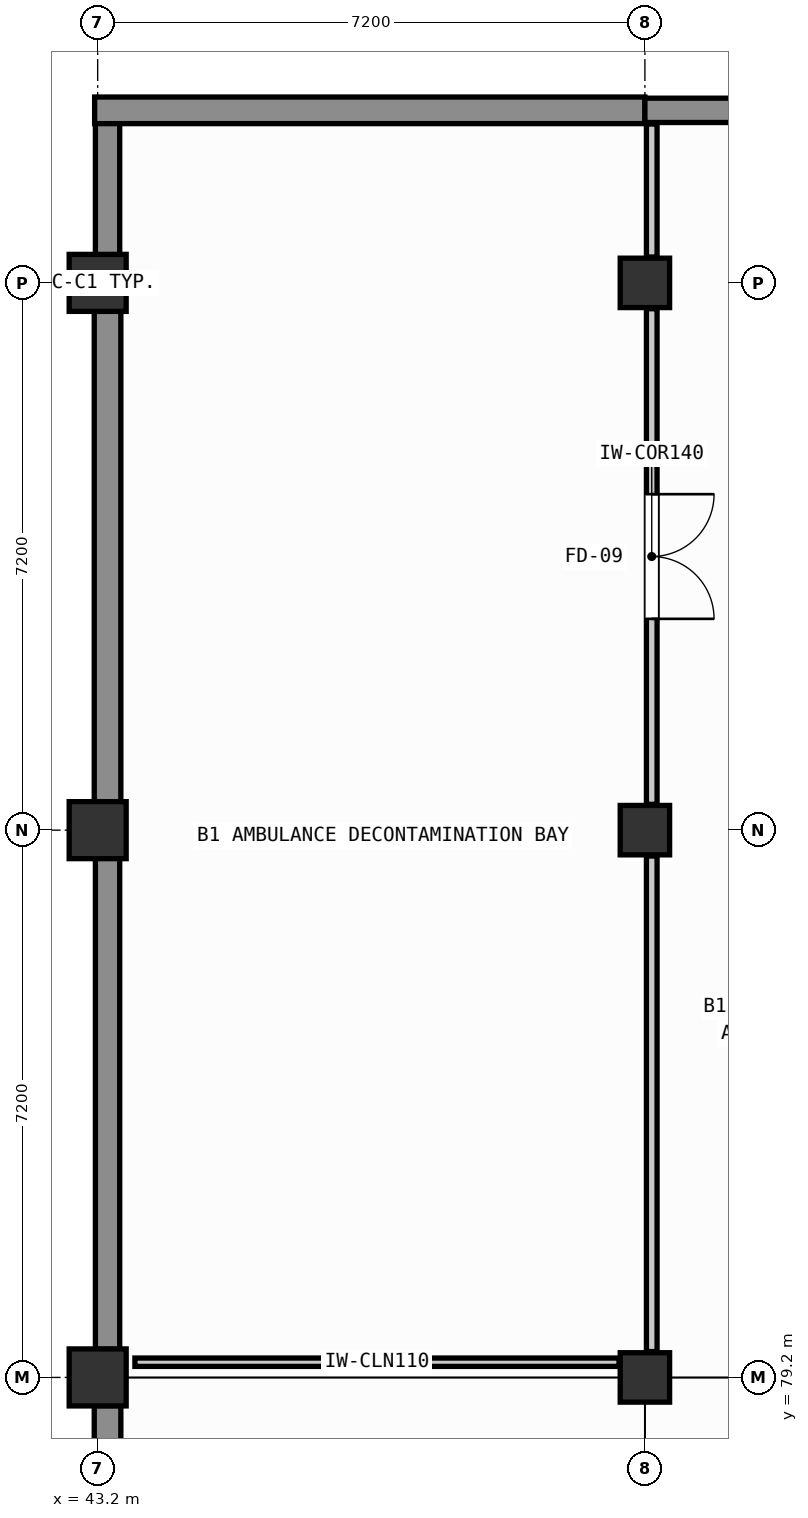
"""IFC4 building model, lengths in metres.
Left out: names, types, materials, properties, quantities, classifications, styles, units other than length and angle.
Written with IfcOpenShell. Run it as: python <this file> out.ifc"""

import sys

from ifc_helpers import new_model, si_unit, direction, frame, frame_2d, origin, origin_2d, place, context, subcontext, project, spatial, rectangle, extrude, element, fill, save


model = new_model("IFC4")
c1 = context("Model", 3, precision=1e-05, world=origin(), true_north=direction((0.0, 1.0)))
c2 = subcontext(c1, "Body", "Model", "MODEL_VIEW")
j1 = project(units=[si_unit("LENGTHUNIT", "METRE"), si_unit("PLANEANGLEUNIT", "RADIAN")], contexts=[c1])
p1 = place(None, origin())
s1 = spatial("IfcSite", under=j1, at=p1, CompositionType="ELEMENT")
p2 = place(p1, origin())
s2 = spatial("IfcBuilding", under=s1, at=p2, CompositionType="ELEMENT")
p3 = place(p2, frame((0.0, 0.0, -4.5)))
s3 = spatial("IfcBuildingStorey", under=s2, at=p3, CompositionType="ELEMENT", Elevation=-4.5)
for number, where, z_axis, x_axis in (
    (1, (43.2, 79.2, -0.5), (0.0, 0.0, 1.0), (1.0, 0.0, 0.0)),
    (2, (43.2, 86.4, -0.5), (0.0, 0.0, 1.0), (1.0, 0.0, 0.0)),
    (3, (43.2, 93.6, -0.5), (0.0, 0.0, 1.0), (1.0, 0.0, 0.0)),
):
    element("IfcColumn", number, at=place(p3, frame(where, z_axis=z_axis, x_axis=x_axis)), inside=s3, PredefinedType="COLUMN", context=c2, shape_type="SweptSolid", body=[
        extrude(rectangle(XDim=0.75, YDim=0.75, at=origin_2d()), origin(), (0.0, 0.0, 1.0), 4.75),
    ])
for number, where, z_axis, x_axis in (
    (4, (50.4, 79.2, -0.5), (0.0, 0.0, 1.0), (1.0, 0.0, 0.0)),
    (5, (50.4, 86.4, -0.5), (0.0, 0.0, 1.0), (1.0, 0.0, 0.0)),
    (6, (50.4, 93.6, -0.5), (0.0, 0.0, 1.0), (1.0, 0.0, 0.0)),
):
    element("IfcColumn", number, at=place(p3, frame(where, z_axis=z_axis, x_axis=x_axis)), inside=s3, PredefinedType="COLUMN", context=c2, shape_type="SweptSolid", body=[
        extrude(rectangle(XDim=0.65, YDim=0.65, at=origin_2d()), origin(), (0.0, 0.0, 1.0), 4.75),
    ])
p4 = place(p3, frame((43.33, 72.37, 0.0), z_axis=(0.0, 0.0, 1.0), x_axis=(0.0, 1.0, 0.0)))
e7 = element("IfcWall", 7, at=p4, inside=s3, PredefinedType="SOLIDWALL", context=c2, shape_type="SweptSolid", body=[
    extrude(rectangle(XDim=6.46, YDim=0.35, at=frame_2d((3.23, 0.0))), origin(), (0.0, 0.0, 1.0), 4.25),
])
p5 = place(p3, frame((43.33, 79.57, 0.0), z_axis=(0.0, 0.0, 1.0), x_axis=(0.0, 1.0, 0.0)))
e8 = element("IfcWall", 8, at=p5, inside=s3, PredefinedType="SOLIDWALL", context=c2, shape_type="SweptSolid", body=[
    extrude(rectangle(XDim=6.46, YDim=0.32, at=frame_2d((3.23, 0.0))), origin(), (0.0, 0.0, 1.0), 4.25),
])
p6 = place(p3, frame((43.33, 86.77, 0.0), z_axis=(0.0, 0.0, 1.0), x_axis=(0.0, 1.0, 0.0)))
e9 = element("IfcWall", 9, at=p6, inside=s3, PredefinedType="SOLIDWALL", context=c2, shape_type="SweptSolid", body=[
    extrude(rectangle(XDim=6.46, YDim=0.35, at=frame_2d((3.23, 0.0))), origin(), (0.0, 0.0, 1.0), 4.25),
])
p7 = place(p3, frame((43.33, 93.97, 0.0), z_axis=(0.0, 0.0, 1.0), x_axis=(0.0, 1.0, 0.0)))
e10 = element("IfcWall", 10, at=p7, inside=s3, PredefinedType="SOLIDWALL", context=c2, shape_type="SweptSolid", body=[
    extrude(rectangle(XDim=2.05, YDim=0.32, at=frame_2d((1.025, 0.0))), origin(), (0.0, 0.0, 1.0), 4.25),
])
p8 = place(p3, frame((43.16, 95.87, 0.0), z_axis=(0.0, 0.0, 1.0), x_axis=(1.0, 0.0, 0.0)))
e11 = element("IfcWall", 11, at=p8, inside=s3, PredefinedType="SOLIDWALL", context=c2, shape_type="SweptSolid", body=[
    extrude(rectangle(XDim=7.24, YDim=0.35, at=frame_2d((3.62, 0.0))), origin(), (0.0, 0.0, 1.0), 4.25),
])
p9 = place(p3, frame((50.4, 95.87, 0.0), z_axis=(0.0, 0.0, 1.0), x_axis=(1.0, 0.0, 0.0)))
e12 = element("IfcWall", 12, at=p9, inside=s3, PredefinedType="SOLIDWALL", context=c2, shape_type="SweptSolid", body=[
    extrude(rectangle(XDim=7.2, YDim=0.32, at=frame_2d((3.6, 0.0))), origin(), (0.0, 0.0, 1.0), 4.25),
])
p10 = place(p3, frame((50.49, 95.69, 0.0), z_axis=(0.0, 0.0, 1.0), x_axis=(0.0, -1.0, 0.0)))
e13 = element("IfcWall", 13, at=p10, inside=s3, PredefinedType="PARTITIONING", context=c2, shape_type="SweptSolid", body=[
    extrude(rectangle(XDim=1.75, YDim=0.14, at=frame_2d((0.875, 0.0))), origin(), (0.0, 0.0, 1.0), 3.4),
])
p11 = place(p3, frame((50.49, 93.26, 0.0), z_axis=(0.0, 0.0, 1.0), x_axis=(0.0, -1.0, 0.0)))
e14 = element("IfcWall", 14, at=p11, inside=s3, PredefinedType="PARTITIONING", context=c2, shape_type="SweptSolid", body=[
    extrude(rectangle(XDim=6.52, YDim=0.14, at=frame_2d((3.26, 0.0))), origin(), (0.0, 0.0, 1.0), 3.4),
])
p12 = place(p11, frame((2.44, 0.0, 0.0)))
e15 = element("IfcOpeningElement", 15, at=p12, cuts=e14, PredefinedType="OPENING", context=c2, shape_type="SweptSolid", body=[
    extrude(rectangle(XDim=1.64, YDim=2.24, at=frame_2d((0.82, 1.12))), frame((0.0, 0.08, 0.0), z_axis=(0.0, -1.0, 0.0), x_axis=(1.0, 0.0, 0.0)), (0.0, 0.0, 1.0), 0.16),
])
p13 = place(p3, frame((50.49, 86.06, 0.0), z_axis=(0.0, 0.0, 1.0), x_axis=(0.0, -1.0, 0.0)))
e16 = element("IfcWall", 16, at=p13, inside=s3, PredefinedType="PARTITIONING", context=c2, shape_type="SweptSolid", body=[
    extrude(rectangle(XDim=6.52, YDim=0.14, at=frame_2d((3.26, 0.0))), origin(), (0.0, 0.0, 1.0), 3.4),
])
p14 = place(p3, frame((50.06, 79.4, 0.0), z_axis=(0.0, 0.0, 1.0), x_axis=(-1.0, 0.0, 0.0)))
e17 = element("IfcWall", 17, at=p14, inside=s3, PredefinedType="PARTITIONING", context=c2, shape_type="SweptSolid", body=[
    extrude(rectangle(XDim=6.37, YDim=0.11, at=frame_2d((3.185, 0.0))), origin(), (0.0, 0.0, 1.0), 3.4),
])
p15 = place(p14, frame((2.485, 0.0, 1.15)))
e18 = element("IfcOpeningElement", 18, at=p15, cuts=e17, PredefinedType="OPENING", context=c2, shape_type="SweptSolid", body=[
    extrude(rectangle(XDim=1.4, YDim=1.05, at=frame_2d((0.7, 0.525))), frame((0.0, 0.065, 0.0), z_axis=(0.0, -1.0, 0.0), x_axis=(1.0, 0.0, 0.0)), (0.0, 0.0, 1.0), 0.13),
])
p16 = place(p12, origin())
e19 = element("IfcDoor", 19, at=p16, inside=s3, OperationType="DOUBLE_DOOR_SINGLE_SWING", PredefinedType="DOOR", context=c2, shape_type="SweptSolid", body=[
    extrude(rectangle(XDim=1.64, YDim=2.24, at=frame_2d((0.82, 1.12))), frame((0.0, 0.025, 0.0), z_axis=(0.0, -1.0, 0.0), x_axis=(1.0, 0.0, 0.0)), (0.0, 0.0, 1.0), 0.05),
])
fill(e15, e19)
p17 = place(p15, origin())
e20 = element("IfcWindow", 20, at=p17, inside=s3, PartitioningType="SINGLE_PANEL", PredefinedType="WINDOW", context=c2, shape_type="SweptSolid", body=[
    extrude(rectangle(XDim=1.4, YDim=1.05, at=frame_2d((0.7, 0.525))), frame((0.0, 0.03, 0.0), z_axis=(0.0, -1.0, 0.0), x_axis=(1.0, 0.0, 0.0)), (0.0, 0.0, 1.0), 0.06),
])
fill(e18, e20)
save(model, sys.argv[1])
